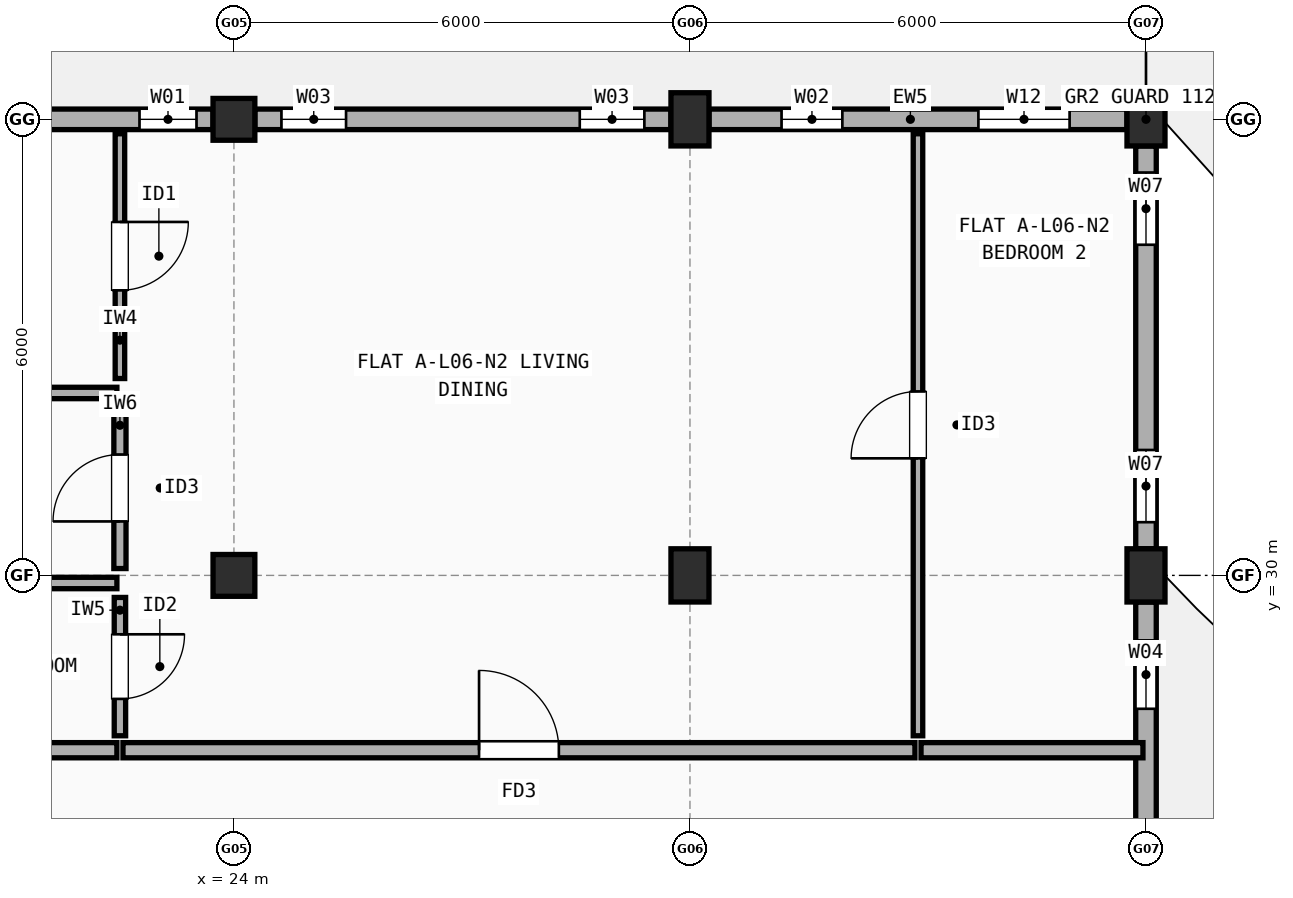
"""IFC4 building model, lengths in metres.
Left out: names, types, materials, properties, quantities, classifications, styles, units other than length and angle.
Written with IfcOpenShell. Run it as: python <this file> out.ifc"""

import sys

from ifc_helpers import new_model, si_unit, direction, frame, frame_2d, origin, origin_2d, place, context, subcontext, project, spatial, rectangle, extrude, element, fill, save


model = new_model("IFC4")
c1 = context("Model", 3, precision=1e-05, world=origin(), true_north=direction((0.0, 1.0)))
c2 = subcontext(c1, "Body", "Model", "MODEL_VIEW")
j1 = project(units=[si_unit("LENGTHUNIT", "METRE"), si_unit("PLANEANGLEUNIT", "RADIAN")], contexts=[c1])
p1 = place(None, origin())
s1 = spatial("IfcSite", under=j1, at=p1, CompositionType="ELEMENT")
p2 = place(p1, origin())
s2 = spatial("IfcBuilding", under=s1, at=p2, CompositionType="ELEMENT")
p3 = place(p2, frame((0.0, 0.0, 20.5)))
s3 = spatial("IfcBuildingStorey", under=s2, at=p3, CompositionType="ELEMENT", Elevation=20.5)
for number, where, z_axis, x_axis in (
    (1, (24.0, 30.0, 0.0), (0.0, 0.0, 1.0), (1.0, 0.0, 0.0)),
    (2, (24.0, 36.0, 0.0), (0.0, 0.0, 1.0), (1.0, 0.0, 0.0)),
):
    element("IfcColumn", number, at=place(p3, frame(where, z_axis=z_axis, x_axis=x_axis)), inside=s3, PredefinedType="COLUMN", context=c2, shape_type="SweptSolid", body=[
        extrude(rectangle(XDim=0.55, YDim=0.55, at=origin_2d()), origin(), (0.0, 0.0, 1.0), 2.97),
    ])
for number, where, z_axis, x_axis in (
    (3, (30.0, 30.0, 0.0), (0.0, 0.0, 1.0), (1.0, 0.0, 0.0)),
    (4, (30.0, 36.0, 0.0), (0.0, 0.0, 1.0), (1.0, 0.0, 0.0)),
    (5, (36.0, 30.0, 0.0), (0.0, 0.0, 1.0), (1.0, 0.0, 0.0)),
    (6, (36.0, 36.0, 0.0), (0.0, 0.0, 1.0), (1.0, 0.0, 0.0)),
):
    element("IfcColumn", number, at=place(p3, frame(where, z_axis=z_axis, x_axis=x_axis)), inside=s3, PredefinedType="COLUMN", context=c2, shape_type="SweptSolid", body=[
        extrude(rectangle(XDim=0.5, YDim=0.7, at=origin_2d()), origin(), (0.0, 0.0, 1.0), 2.97),
    ])
p4 = place(p3, frame((36.0, 24.35, 0.0), z_axis=(0.0, 0.0, 1.0), x_axis=(0.0, 1.0, 0.0)))
e7 = element("IfcWall", 7, at=p4, inside=s3, PredefinedType="STANDARD", context=c2, shape_type="SweptSolid", body=[
    extrude(rectangle(XDim=5.3, YDim=0.27, at=frame_2d((2.65, 0.0))), origin(), (0.0, 0.0, 1.0), 2.452),
])
p5 = place(p4, frame((1.23, 0.0, 0.9)))
e8 = element("IfcOpeningElement", 8, at=p5, cuts=e7, PredefinedType="OPENING", context=c2, shape_type="SweptSolid", body=[
    extrude(rectangle(XDim=0.85, YDim=1.25, at=frame_2d((0.425, 0.625))), frame((0.0, 0.145, 0.0), z_axis=(0.0, -1.0, 0.0), x_axis=(1.0, 0.0, 0.0)), (0.0, 0.0, 1.0), 0.29),
])
p6 = place(p4, frame((3.895, 0.0, 0.9)))
e9 = element("IfcOpeningElement", 9, at=p6, cuts=e7, PredefinedType="OPENING", context=c2, shape_type="SweptSolid", body=[
    extrude(rectangle(XDim=0.9, YDim=1.3, at=frame_2d((0.45, 0.65))), frame((0.0, 0.145, 0.0), z_axis=(0.0, -1.0, 0.0), x_axis=(1.0, 0.0, 0.0)), (0.0, 0.0, 1.0), 0.29),
])
p7 = place(p3, frame((36.0, 30.35, 0.0), z_axis=(0.0, 0.0, 1.0), x_axis=(0.0, 1.0, 0.0)))
e10 = element("IfcWall", 10, at=p7, inside=s3, PredefinedType="STANDARD", context=c2, shape_type="SweptSolid", body=[
    extrude(rectangle(XDim=5.3, YDim=0.27, at=frame_2d((2.65, 0.0))), origin(), (0.0, 0.0, 1.0), 2.452),
])
p8 = place(p7, frame((0.35, 0.0, 0.9)))
e11 = element("IfcOpeningElement", 11, at=p8, cuts=e10, PredefinedType="OPENING", context=c2, shape_type="SweptSolid", body=[
    extrude(rectangle(XDim=0.95, YDim=1.35, at=frame_2d((0.475, 0.675))), frame((0.0, 0.145, 0.0), z_axis=(0.0, -1.0, 0.0), x_axis=(1.0, 0.0, 0.0)), (0.0, 0.0, 1.0), 0.29),
])
p9 = place(p7, frame((4.0, 0.0, 0.9)))
e12 = element("IfcOpeningElement", 12, at=p9, cuts=e10, PredefinedType="OPENING", context=c2, shape_type="SweptSolid", body=[
    extrude(rectangle(XDim=0.95, YDim=1.35, at=frame_2d((0.475, 0.675))), frame((0.0, 0.145, 0.0), z_axis=(0.0, -1.0, 0.0), x_axis=(1.0, 0.0, 0.0)), (0.0, 0.0, 1.0), 0.29),
])
p10 = place(p3, frame((35.75, 36.0, 0.0), z_axis=(0.0, 0.0, 1.0), x_axis=(-1.0, 0.0, 0.0)))
e13 = element("IfcWall", 13, at=p10, inside=s3, PredefinedType="STANDARD", context=c2, shape_type="SweptSolid", body=[
    extrude(rectangle(XDim=5.5, YDim=0.27, at=frame_2d((2.75, 0.0))), origin(), (0.0, 0.0, 1.0), 2.452),
])
p11 = place(p10, frame((0.755, 0.0, 0.9)))
e14 = element("IfcOpeningElement", 14, at=p11, cuts=e13, PredefinedType="OPENING", context=c2, shape_type="SweptSolid", body=[
    extrude(rectangle(XDim=1.2, YDim=1.35, at=frame_2d((0.6, 0.675))), frame((0.0, 0.145, 0.0), z_axis=(0.0, -1.0, 0.0), x_axis=(1.0, 0.0, 0.0)), (0.0, 0.0, 1.0), 0.29),
])
p12 = place(p10, frame((3.745, 0.0, 0.9)))
e15 = element("IfcOpeningElement", 15, at=p12, cuts=e13, PredefinedType="OPENING", context=c2, shape_type="SweptSolid", body=[
    extrude(rectangle(XDim=0.8, YDim=1.2, at=frame_2d((0.4, 0.6))), frame((0.0, 0.145, 0.0), z_axis=(0.0, -1.0, 0.0), x_axis=(1.0, 0.0, 0.0)), (0.0, 0.0, 1.0), 0.29),
])
p13 = place(p3, frame((29.75, 36.0, 0.0), z_axis=(0.0, 0.0, 1.0), x_axis=(-1.0, 0.0, 0.0)))
e16 = element("IfcWall", 16, at=p13, inside=s3, PredefinedType="STANDARD", context=c2, shape_type="SweptSolid", body=[
    extrude(rectangle(XDim=5.475, YDim=0.27, at=frame_2d((2.738, 0.0))), origin(), (0.0, 0.0, 1.0), 2.452),
])
p14 = place(p13, frame((0.35, 0.0, 0.9)))
e17 = element("IfcOpeningElement", 17, at=p14, cuts=e16, PredefinedType="OPENING", context=c2, shape_type="SweptSolid", body=[
    extrude(rectangle(XDim=0.85, YDim=1.25, at=frame_2d((0.425, 0.625))), frame((0.0, 0.145, 0.0), z_axis=(0.0, -1.0, 0.0), x_axis=(1.0, 0.0, 0.0)), (0.0, 0.0, 1.0), 0.29),
])
p15 = place(p13, frame((4.275, 0.0, 0.9)))
e18 = element("IfcOpeningElement", 18, at=p15, cuts=e16, PredefinedType="OPENING", context=c2, shape_type="SweptSolid", body=[
    extrude(rectangle(XDim=0.85, YDim=1.25, at=frame_2d((0.425, 0.625))), frame((0.0, 0.145, 0.0), z_axis=(0.0, -1.0, 0.0), x_axis=(1.0, 0.0, 0.0)), (0.0, 0.0, 1.0), 0.29),
])
p16 = place(p3, frame((23.725, 36.0, 0.0), z_axis=(0.0, 0.0, 1.0), x_axis=(-1.0, 0.0, 0.0)))
e19 = element("IfcWall", 19, at=p16, inside=s3, PredefinedType="STANDARD", context=c2, shape_type="SweptSolid", body=[
    extrude(rectangle(XDim=5.45, YDim=0.27, at=frame_2d((2.725, 0.0))), origin(), (0.0, 0.0, 1.0), 2.452),
])
p17 = place(p16, frame((2.633, 0.0, 0.0)))
e20 = element("IfcOpeningElement", 20, at=p17, cuts=e19, PredefinedType="OPENING", context=c2, shape_type="SweptSolid", body=[
    extrude(rectangle(XDim=1.45, YDim=2.15, at=frame_2d((0.725, 1.075))), frame((0.0, 0.145, 0.0), z_axis=(0.0, -1.0, 0.0), x_axis=(1.0, 0.0, 0.0)), (0.0, 0.0, 1.0), 0.29),
])
p18 = place(p16, frame((0.218, 0.0, 0.9)))
e21 = element("IfcOpeningElement", 21, at=p18, cuts=e19, PredefinedType="OPENING", context=c2, shape_type="SweptSolid", body=[
    extrude(rectangle(XDim=0.75, YDim=1.15, at=frame_2d((0.375, 0.575))), frame((0.0, 0.145, 0.0), z_axis=(0.0, -1.0, 0.0), x_axis=(1.0, 0.0, 0.0)), (0.0, 0.0, 1.0), 0.29),
])
p19 = place(p3, frame((18.04, 27.7, 0.0), z_axis=(0.0, 0.0, 1.0), x_axis=(1.0, 0.0, 0.0)))
e22 = element("IfcWall", 22, at=p19, inside=s3, PredefinedType="SOLIDWALL", context=c2, shape_type="SweptSolid", body=[
    extrude(rectangle(XDim=4.42, YDim=0.2, at=frame_2d((2.21, 0.0))), origin(), (0.0, 0.0, 1.0), 2.97),
])
p20 = place(p3, frame((22.54, 27.7, 0.0), z_axis=(0.0, 0.0, 1.0), x_axis=(1.0, 0.0, 0.0)))
e23 = element("IfcWall", 23, at=p20, inside=s3, PredefinedType="SOLIDWALL", context=c2, shape_type="SweptSolid", body=[
    extrude(rectangle(XDim=10.42, YDim=0.2, at=frame_2d((5.21, 0.0))), origin(), (0.0, 0.0, 1.0), 2.452),
])
p21 = place(p20, frame((4.685, 0.0, 0.0)))
e24 = element("IfcOpeningElement", 24, at=p21, cuts=e23, PredefinedType="OPENING", context=c2, shape_type="SweptSolid", body=[
    extrude(rectangle(XDim=1.05, YDim=2.15, at=frame_2d((0.525, 1.075))), frame((0.0, 0.11, 0.0), z_axis=(0.0, -1.0, 0.0), x_axis=(1.0, 0.0, 0.0)), (0.0, 0.0, 1.0), 0.22),
])
p22 = place(p3, frame((22.5, 32.59, 0.0), z_axis=(0.0, 0.0, 1.0), x_axis=(0.0, 1.0, 0.0)))
e25 = element("IfcWall", 25, at=p22, inside=s3, PredefinedType="PARTITIONING", context=c2, shape_type="SweptSolid", body=[
    extrude(rectangle(XDim=3.22, YDim=0.125, at=frame_2d((1.61, 0.0))), origin(), (0.0, 0.0, 1.0), 2.97),
])
p23 = place(p22, frame((1.16, 0.0, 0.0)))
e26 = element("IfcOpeningElement", 26, at=p23, cuts=e25, PredefinedType="OPENING", context=c2, shape_type="SweptSolid", body=[
    extrude(rectangle(XDim=0.9, YDim=2.1, at=frame_2d((0.45, 1.05))), frame((0.0, 0.073, 0.0), z_axis=(0.0, -1.0, 0.0), x_axis=(1.0, 0.0, 0.0)), (0.0, 0.0, 1.0), 0.145),
])
p24 = place(p3, frame((22.5, 30.09, 0.0), z_axis=(0.0, 0.0, 1.0), x_axis=(0.0, 1.0, 0.0)))
e27 = element("IfcWall", 27, at=p24, inside=s3, PredefinedType="PLUMBINGWALL", context=c2, shape_type="SweptSolid", body=[
    extrude(rectangle(XDim=2.12, YDim=0.16, at=frame_2d((1.06, 0.0))), origin(), (0.0, 0.0, 1.0), 2.452),
])
p25 = place(p24, frame((0.62, 0.0, 0.0)))
e28 = element("IfcOpeningElement", 28, at=p25, cuts=e27, PredefinedType="OPENING", context=c2, shape_type="SweptSolid", body=[
    extrude(rectangle(XDim=0.88, YDim=2.1, at=frame_2d((0.44, 1.05))), frame((0.0, 0.09, 0.0), z_axis=(0.0, -1.0, 0.0), x_axis=(1.0, 0.0, 0.0)), (0.0, 0.0, 1.0), 0.18),
])
p26 = place(p3, frame((22.5, 27.89, 0.0), z_axis=(0.0, 0.0, 1.0), x_axis=(0.0, 1.0, 0.0)))
e29 = element("IfcWall", 29, at=p26, inside=s3, PredefinedType="PARTITIONING", context=c2, shape_type="SweptSolid", body=[
    extrude(rectangle(XDim=1.82, YDim=0.15, at=frame_2d((0.91, 0.0))), origin(), (0.0, 0.0, 1.0), 2.97),
])
p27 = place(p26, frame((0.485, 0.0, 0.0)))
e30 = element("IfcOpeningElement", 30, at=p27, cuts=e29, PredefinedType="OPENING", context=c2, shape_type="SweptSolid", body=[
    extrude(rectangle(XDim=0.85, YDim=2.1, at=frame_2d((0.425, 1.05))), frame((0.0, 0.085, 0.0), z_axis=(0.0, -1.0, 0.0), x_axis=(1.0, 0.0, 0.0)), (0.0, 0.0, 1.0), 0.17),
])
p28 = place(p3, frame((18.04, 32.4, 0.0), z_axis=(0.0, 0.0, 1.0), x_axis=(1.0, 0.0, 0.0)))
e31 = element("IfcWall", 31, at=p28, inside=s3, PredefinedType="PARTITIONING", context=c2, shape_type="SweptSolid", body=[
    extrude(rectangle(XDim=4.42, YDim=0.15, at=frame_2d((2.21, 0.0))), origin(), (0.0, 0.0, 1.0), 2.458),
])
p29 = place(p3, frame((18.36, 29.9, 0.0), z_axis=(0.0, 0.0, 1.0), x_axis=(1.0, 0.0, 0.0)))
e32 = element("IfcWall", 32, at=p29, inside=s3, PredefinedType="PARTITIONING", context=c2, shape_type="SweptSolid", body=[
    extrude(rectangle(XDim=4.1, YDim=0.15, at=frame_2d((2.05, 0.0))), origin(), (0.0, 0.0, 1.0), 2.452),
])
p30 = place(p3, frame((33.04, 27.7, 0.0), z_axis=(0.0, 0.0, 1.0), x_axis=(1.0, 0.0, 0.0)))
e33 = element("IfcWall", 33, at=p30, inside=s3, PredefinedType="SOLIDWALL", context=c2, shape_type="SweptSolid", body=[
    extrude(rectangle(XDim=2.92, YDim=0.2, at=frame_2d((1.46, 0.0))), origin(), (0.0, 0.0, 1.0), 2.452),
])
p31 = place(p3, frame((33.0, 27.89, 0.0), z_axis=(0.0, 0.0, 1.0), x_axis=(0.0, 1.0, 0.0)))
e34 = element("IfcWall", 34, at=p31, inside=s3, PredefinedType="PARTITIONING", context=c2, shape_type="SweptSolid", body=[
    extrude(rectangle(XDim=7.92, YDim=0.125, at=frame_2d((3.96, 0.0))), origin(), (0.0, 0.0, 1.0), 2.452),
])
p32 = place(p31, frame((3.65, 0.0, 0.0)))
e35 = element("IfcOpeningElement", 35, at=p32, cuts=e34, PredefinedType="OPENING", context=c2, shape_type="SweptSolid", body=[
    extrude(rectangle(XDim=0.88, YDim=2.1, at=frame_2d((0.44, 1.05))), frame((0.0, 0.073, 0.0), z_axis=(0.0, -1.0, 0.0), x_axis=(1.0, 0.0, 0.0)), (0.0, 0.0, 1.0), 0.145),
])
p33 = place(p6, origin())
e36 = element("IfcWindow", 36, at=p33, inside=s3, PartitioningType="SINGLE_PANEL", PredefinedType="WINDOW", context=c2, shape_type="SweptSolid", body=[
    extrude(rectangle(XDim=0.9, YDim=1.3, at=frame_2d((0.45, 0.65))), frame((0.0, 0.03, 0.0), z_axis=(0.0, -1.0, 0.0), x_axis=(1.0, 0.0, 0.0)), (0.0, 0.0, 1.0), 0.06),
])
fill(e9, e36)
p34 = place(p8, origin())
e37 = element("IfcWindow", 37, at=p34, inside=s3, PartitioningType="SINGLE_PANEL", PredefinedType="WINDOW", context=c2, shape_type="SweptSolid", body=[
    extrude(rectangle(XDim=0.95, YDim=1.35, at=frame_2d((0.475, 0.675))), frame((0.0, 0.03, 0.0), z_axis=(0.0, -1.0, 0.0), x_axis=(1.0, 0.0, 0.0)), (0.0, 0.0, 1.0), 0.06),
])
fill(e11, e37)
p35 = place(p9, origin())
e38 = element("IfcWindow", 38, at=p35, inside=s3, PartitioningType="SINGLE_PANEL", PredefinedType="WINDOW", context=c2, shape_type="SweptSolid", body=[
    extrude(rectangle(XDim=0.95, YDim=1.35, at=frame_2d((0.475, 0.675))), frame((0.0, 0.03, 0.0), z_axis=(0.0, -1.0, 0.0), x_axis=(1.0, 0.0, 0.0)), (0.0, 0.0, 1.0), 0.06),
])
fill(e12, e38)
p36 = place(p11, origin())
e39 = element("IfcWindow", 39, at=p36, inside=s3, PartitioningType="SINGLE_PANEL", PredefinedType="WINDOW", context=c2, shape_type="SweptSolid", body=[
    extrude(rectangle(XDim=1.2, YDim=1.35, at=frame_2d((0.6, 0.675))), frame((0.0, 0.03, 0.0), z_axis=(0.0, -1.0, 0.0), x_axis=(1.0, 0.0, 0.0)), (0.0, 0.0, 1.0), 0.06),
])
fill(e14, e39)
p37 = place(p12, origin())
e40 = element("IfcWindow", 40, at=p37, inside=s3, PartitioningType="SINGLE_PANEL", PredefinedType="WINDOW", context=c2, shape_type="SweptSolid", body=[
    extrude(rectangle(XDim=0.8, YDim=1.2, at=frame_2d((0.4, 0.6))), frame((0.0, 0.03, 0.0), z_axis=(0.0, -1.0, 0.0), x_axis=(1.0, 0.0, 0.0)), (0.0, 0.0, 1.0), 0.06),
])
fill(e15, e40)
p38 = place(p14, origin())
e41 = element("IfcWindow", 41, at=p38, inside=s3, PartitioningType="SINGLE_PANEL", PredefinedType="WINDOW", context=c2, shape_type="SweptSolid", body=[
    extrude(rectangle(XDim=0.85, YDim=1.25, at=frame_2d((0.425, 0.625))), frame((0.0, 0.03, 0.0), z_axis=(0.0, -1.0, 0.0), x_axis=(1.0, 0.0, 0.0)), (0.0, 0.0, 1.0), 0.06),
])
fill(e17, e41)
p39 = place(p15, origin())
e42 = element("IfcWindow", 42, at=p39, inside=s3, PartitioningType="SINGLE_PANEL", PredefinedType="WINDOW", context=c2, shape_type="SweptSolid", body=[
    extrude(rectangle(XDim=0.85, YDim=1.25, at=frame_2d((0.425, 0.625))), frame((0.0, 0.03, 0.0), z_axis=(0.0, -1.0, 0.0), x_axis=(1.0, 0.0, 0.0)), (0.0, 0.0, 1.0), 0.06),
])
fill(e18, e42)
p40 = place(p18, origin())
e43 = element("IfcWindow", 43, at=p40, inside=s3, PartitioningType="SINGLE_PANEL", PredefinedType="WINDOW", context=c2, shape_type="SweptSolid", body=[
    extrude(rectangle(XDim=0.75, YDim=1.15, at=frame_2d((0.375, 0.575))), frame((0.0, 0.03, 0.0), z_axis=(0.0, -1.0, 0.0), x_axis=(1.0, 0.0, 0.0)), (0.0, 0.0, 1.0), 0.06),
])
fill(e21, e43)
p41 = place(p21, origin())
e44 = element("IfcDoor", 44, at=p41, inside=s3, OperationType="SINGLE_SWING_LEFT", PredefinedType="DOOR", context=c2, shape_type="SweptSolid", body=[
    extrude(rectangle(XDim=1.05, YDim=2.15, at=frame_2d((0.525, 1.075))), frame((0.0, 0.025, 0.0), z_axis=(0.0, -1.0, 0.0), x_axis=(1.0, 0.0, 0.0)), (0.0, 0.0, 1.0), 0.05),
])
fill(e24, e44)
p42 = place(p23, origin())
e45 = element("IfcDoor", 45, at=p42, inside=s3, OperationType="SINGLE_SWING_RIGHT", PredefinedType="DOOR", context=c2, shape_type="SweptSolid", body=[
    extrude(rectangle(XDim=0.9, YDim=2.1, at=frame_2d((0.45, 1.05))), frame((0.0, 0.025, 0.0), z_axis=(0.0, -1.0, 0.0), x_axis=(1.0, 0.0, 0.0)), (0.0, 0.0, 1.0), 0.05),
])
fill(e26, e45)
p43 = place(p25, origin())
e46 = element("IfcDoor", 46, at=p43, inside=s3, OperationType="SINGLE_SWING_LEFT", PredefinedType="DOOR", context=c2, shape_type="SweptSolid", body=[
    extrude(rectangle(XDim=0.88, YDim=2.1, at=frame_2d((0.44, 1.05))), frame((0.0, 0.025, 0.0), z_axis=(0.0, -1.0, 0.0), x_axis=(1.0, 0.0, 0.0)), (0.0, 0.0, 1.0), 0.05),
])
fill(e28, e46)
p44 = place(p27, origin())
e47 = element("IfcDoor", 47, at=p44, inside=s3, OperationType="SINGLE_SWING_RIGHT", PredefinedType="DOOR", context=c2, shape_type="SweptSolid", body=[
    extrude(rectangle(XDim=0.85, YDim=2.1, at=frame_2d((0.425, 1.05))), frame((0.0, 0.025, 0.0), z_axis=(0.0, -1.0, 0.0), x_axis=(1.0, 0.0, 0.0)), (0.0, 0.0, 1.0), 0.05),
])
fill(e30, e47)
p45 = place(p32, origin())
e48 = element("IfcDoor", 48, at=p45, inside=s3, OperationType="SINGLE_SWING_LEFT", PredefinedType="DOOR", context=c2, shape_type="SweptSolid", body=[
    extrude(rectangle(XDim=0.88, YDim=2.1, at=frame_2d((0.44, 1.05))), frame((0.0, 0.025, 0.0), z_axis=(0.0, -1.0, 0.0), x_axis=(1.0, 0.0, 0.0)), (0.0, 0.0, 1.0), 0.05),
])
fill(e35, e48)
save(model, sys.argv[1])
